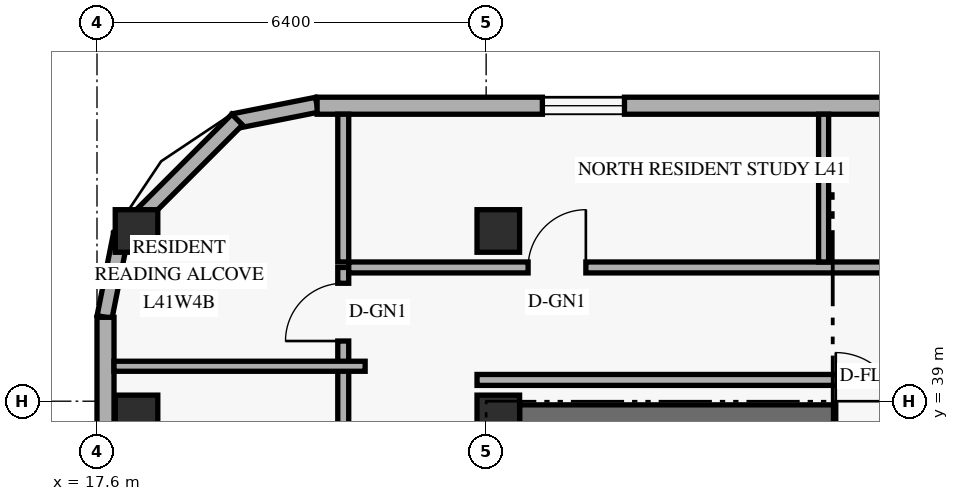
"""IFC4 building model, lengths in metres.
Left out: names, types, materials, properties, quantities, classifications, styles, units other than length and angle.
Written with IfcOpenShell. Run it as: python <this file> out.ifc"""

import sys

from ifc_helpers import new_model, si_unit, direction, frame, frame_2d, origin, origin_2d, place, context, subcontext, project, spatial, rectangle, extrude, element, fill, save


model = new_model("IFC4")
c1 = context("Model", 3, precision=1e-05, world=origin(), true_north=direction((0.0, 1.0)))
c2 = subcontext(c1, "Body", "Model", "MODEL_VIEW")
j1 = project(units=[si_unit("LENGTHUNIT", "METRE"), si_unit("PLANEANGLEUNIT", "RADIAN")], contexts=[c1])
p1 = place(None, origin())
s1 = spatial("IfcSite", under=j1, at=p1, CompositionType="ELEMENT")
p2 = place(p1, origin())
s2 = spatial("IfcBuilding", under=s1, at=p2, CompositionType="ELEMENT")
p3 = place(p2, frame((0.0, 0.0, 159.0)))
s3 = spatial("IfcBuildingStorey", under=s2, at=p3, CompositionType="ELEMENT", Elevation=159.0)
p4 = place(p3, frame((24.55, 38.75, 0.0), z_axis=(0.0, 0.0, 1.0), x_axis=(1.0, 0.0, 0.0)))
e1 = element("IfcWall", 1, at=p4, inside=s3, PredefinedType="SHEAR", context=c2, shape_type="SweptSolid", body=[
    extrude(rectangle(XDim=10.3, YDim=0.38, at=frame_2d((5.15, 0.0))), origin(), (0.0, 0.0, 1.0), 3.36),
])
p5 = place(p4, frame((5.2, 0.0, 0.0)))
e2 = element("IfcOpeningElement", 2, at=p5, cuts=e1, PredefinedType="OPENING", context=c2, shape_type="SweptSolid", body=[
    extrude(rectangle(XDim=1.05, YDim=2.15, at=frame_2d((0.525, 1.075))), frame((0.0, 0.2, 0.0), z_axis=(0.0, -1.0, 0.0), x_axis=(1.0, 0.0, 0.0)), (0.0, 0.0, 1.0), 0.4),
])
for number, where, z_axis, x_axis in (
    (3, (18.25, 38.75, 0.0), (0.0, 0.0, 1.0), (1.0, 0.0, 0.0)),
    (4, (18.25, 41.8, 0.0), (0.0, 0.0, 1.0), (1.0, 0.0, 0.0)),
    (5, (24.2, 38.75, 0.0), (0.0, 0.0, 1.0), (1.0, 0.0, 0.0)),
    (6, (24.2, 41.8, 0.0), (0.0, 0.0, 1.0), (1.0, 0.0, 0.0)),
):
    element("IfcColumn", number, at=place(p3, frame(where, z_axis=z_axis, x_axis=x_axis)), inside=s3, PredefinedType="COLUMN", context=c2, shape_type="SweptSolid", body=[
        extrude(rectangle(XDim=0.7, YDim=0.7, at=origin_2d()), origin(), (0.0, 0.0, 1.0), 3.6),
    ])
p6 = place(p3, frame((21.217, 43.876, 0.0), z_axis=(0.0, 0.0, 1.0), x_axis=(-0.980809899341, -0.19496651342, 0.0)))
e7 = element("IfcWall", 7, at=p6, inside=s3, PredefinedType="SOLIDWALL", context=c2, shape_type="SweptSolid", body=[
    extrude(rectangle(XDim=1.389, YDim=0.25, at=frame_2d((0.694, 0.0))), origin(), (0.0, 0.0, 1.0), 3.36),
])
p7 = place(p3, frame((19.905, 43.632, 0.0), z_axis=(0.0, 0.0, 1.0), x_axis=(-0.707106781187, -0.707106781187, 0.0)))
e8 = element("IfcWall", 8, at=p7, inside=s3, PredefinedType="SOLIDWALL", context=c2, shape_type="SweptSolid", body=[
    extrude(rectangle(XDim=2.739, YDim=0.25, at=frame_2d((1.37, 0.0))), origin(), (0.0, 0.0, 1.0), 3.36),
])
p8 = place(p3, frame((17.995, 41.746, 0.0), z_axis=(0.0, 0.0, 1.0), x_axis=(-0.195135625965, -0.9807762678, 0.0)))
e9 = element("IfcWall", 9, at=p8, inside=s3, PredefinedType="SOLIDWALL", context=c2, shape_type="SweptSolid", body=[
    extrude(rectangle(XDim=1.389, YDim=0.25, at=frame_2d((0.694, 0.0))), origin(), (0.0, 0.0, 1.0), 3.36),
])
p9 = place(p3, frame((54.98, 43.86, 0.0), z_axis=(0.0, 0.0, 1.0), x_axis=(-1.0, 0.0, 0.0)))
e10 = element("IfcWall", 10, at=p9, inside=s3, PredefinedType="SOLIDWALL", context=c2, shape_type="SweptSolid", body=[
    extrude(rectangle(XDim=33.76, YDim=0.28, at=frame_2d((16.88, 0.0))), origin(), (0.0, 0.0, 1.0), 3.36),
])
p10 = place(p9, frame((28.705, 0.0, 0.85)))
e11 = element("IfcOpeningElement", 11, at=p10, cuts=e10, PredefinedType="OPENING", context=c2, shape_type="SweptSolid", body=[
    extrude(rectangle(XDim=1.35, YDim=1.55, at=frame_2d((0.675, 0.775))), frame((0.0, 0.15, 0.0), z_axis=(0.0, -1.0, 0.0), x_axis=(1.0, 0.0, 0.0)), (0.0, 0.0, 1.0), 0.3),
])
p11 = place(p9, frame((21.82, 0.0, 0.85)))
e12 = element("IfcOpeningElement", 12, at=p11, cuts=e10, PredefinedType="OPENING", context=c2, shape_type="SweptSolid", body=[
    extrude(rectangle(XDim=1.35, YDim=1.55, at=frame_2d((0.675, 0.775))), frame((0.0, 0.15, 0.0), z_axis=(0.0, -1.0, 0.0), x_axis=(1.0, 0.0, 0.0)), (0.0, 0.0, 1.0), 0.3),
])
p12 = place(p9, frame((15.146, 0.0, 0.85)))
e13 = element("IfcOpeningElement", 13, at=p12, cuts=e10, PredefinedType="OPENING", context=c2, shape_type="SweptSolid", body=[
    extrude(rectangle(XDim=1.35, YDim=1.55, at=frame_2d((0.675, 0.775))), frame((0.0, 0.15, 0.0), z_axis=(0.0, -1.0, 0.0), x_axis=(1.0, 0.0, 0.0)), (0.0, 0.0, 1.0), 0.3),
])
p13 = place(p9, frame((7.956, 0.0, 0.85)))
e14 = element("IfcOpeningElement", 14, at=p13, cuts=e10, PredefinedType="OPENING", context=c2, shape_type="SweptSolid", body=[
    extrude(rectangle(XDim=1.35, YDim=1.55, at=frame_2d((0.675, 0.775))), frame((0.0, 0.15, 0.0), z_axis=(0.0, -1.0, 0.0), x_axis=(1.0, 0.0, 0.0)), (0.0, 0.0, 1.0), 0.3),
])
p14 = place(p9, frame((1.915, 0.0, 0.85)))
e15 = element("IfcOpeningElement", 15, at=p14, cuts=e10, PredefinedType="OPENING", context=c2, shape_type="SweptSolid", body=[
    extrude(rectangle(XDim=1.35, YDim=1.55, at=frame_2d((0.675, 0.775))), frame((0.0, 0.15, 0.0), z_axis=(0.0, -1.0, 0.0), x_axis=(1.0, 0.0, 0.0)), (0.0, 0.0, 1.0), 0.3),
])
p15 = place(p3, frame((17.74, 40.38, 0.0), z_axis=(0.0, 0.0, 1.0), x_axis=(0.0, -1.0, 0.0)))
e16 = element("IfcWall", 16, at=p15, inside=s3, PredefinedType="SOLIDWALL", context=c2, shape_type="SweptSolid", body=[
    extrude(rectangle(XDim=32.76, YDim=0.28, at=frame_2d((16.38, 0.0))), origin(), (0.0, 0.0, 1.0), 3.36),
])
p16 = place(p15, frame((27.91, 0.0, 0.85)))
e17 = element("IfcOpeningElement", 17, at=p16, cuts=e16, PredefinedType="OPENING", context=c2, shape_type="SweptSolid", body=[
    extrude(rectangle(XDim=1.65, YDim=1.6, at=frame_2d((0.825, 0.8))), frame((0.0, 0.15, 0.0), z_axis=(0.0, -1.0, 0.0), x_axis=(1.0, 0.0, 0.0)), (0.0, 0.0, 1.0), 0.3),
])
p17 = place(p15, frame((24.2, 0.0, 0.85)))
e18 = element("IfcOpeningElement", 18, at=p17, cuts=e16, PredefinedType="OPENING", context=c2, shape_type="SweptSolid", body=[
    extrude(rectangle(XDim=1.65, YDim=1.6, at=frame_2d((0.825, 0.8))), frame((0.0, 0.15, 0.0), z_axis=(0.0, -1.0, 0.0), x_axis=(1.0, 0.0, 0.0)), (0.0, 0.0, 1.0), 0.3),
])
p18 = place(p15, frame((18.38, 0.0, 0.85)))
e19 = element("IfcOpeningElement", 19, at=p18, cuts=e16, PredefinedType="OPENING", context=c2, shape_type="SweptSolid", body=[
    extrude(rectangle(XDim=1.65, YDim=1.6, at=frame_2d((0.825, 0.8))), frame((0.0, 0.15, 0.0), z_axis=(0.0, -1.0, 0.0), x_axis=(1.0, 0.0, 0.0)), (0.0, 0.0, 1.0), 0.3),
])
p19 = place(p15, frame((12.955, 0.0, 0.85)))
e20 = element("IfcOpeningElement", 20, at=p19, cuts=e16, PredefinedType="OPENING", context=c2, shape_type="SweptSolid", body=[
    extrude(rectangle(XDim=1.65, YDim=1.6, at=frame_2d((0.825, 0.8))), frame((0.0, 0.15, 0.0), z_axis=(0.0, -1.0, 0.0), x_axis=(1.0, 0.0, 0.0)), (0.0, 0.0, 1.0), 0.3),
])
p20 = place(p15, frame((7.035, 0.0, 0.85)))
e21 = element("IfcOpeningElement", 21, at=p20, cuts=e16, PredefinedType="OPENING", context=c2, shape_type="SweptSolid", body=[
    extrude(rectangle(XDim=1.65, YDim=1.6, at=frame_2d((0.825, 0.8))), frame((0.0, 0.15, 0.0), z_axis=(0.0, -1.0, 0.0), x_axis=(1.0, 0.0, 0.0)), (0.0, 0.0, 1.0), 0.3),
])
p21 = place(p15, frame((3.2, 0.0, 0.85)))
e22 = element("IfcOpeningElement", 22, at=p21, cuts=e16, PredefinedType="OPENING", context=c2, shape_type="SweptSolid", body=[
    extrude(rectangle(XDim=1.65, YDim=1.6, at=frame_2d((0.825, 0.8))), frame((0.0, 0.15, 0.0), z_axis=(0.0, -1.0, 0.0), x_axis=(1.0, 0.0, 0.0)), (0.0, 0.0, 1.0), 0.3),
])
p22 = place(p3, frame((21.65, 6.8, 0.0), z_axis=(0.0, 0.0, 1.0), x_axis=(0.0, 1.0, 0.0)))
e23 = element("IfcWall", 23, at=p22, inside=s3, PredefinedType="STANDARD", context=c2, shape_type="SweptSolid", body=[
    extrude(rectangle(XDim=34.4, YDim=0.18, at=frame_2d((17.2, 0.0))), origin(), (0.0, 0.0, 1.0), 2.73),
])
p23 = place(p22, frame((0.3, 0.0, 0.0)))
e24 = element("IfcOpeningElement", 24, at=p23, cuts=e23, PredefinedType="OPENING", context=c2, shape_type="SweptSolid", body=[
    extrude(rectangle(XDim=0.95, YDim=2.15, at=frame_2d((0.475, 1.075))), frame((0.0, 0.1, 0.0), z_axis=(0.0, -1.0, 0.0), x_axis=(1.0, 0.0, 0.0)), (0.0, 0.0, 1.0), 0.2),
])
p24 = place(p22, frame((4.167, 0.0, 0.0)))
e25 = element("IfcOpeningElement", 25, at=p24, cuts=e23, PredefinedType="OPENING", context=c2, shape_type="SweptSolid", body=[
    extrude(rectangle(XDim=0.95, YDim=2.15, at=frame_2d((0.475, 1.075))), frame((0.0, 0.1, 0.0), z_axis=(0.0, -1.0, 0.0), x_axis=(1.0, 0.0, 0.0)), (0.0, 0.0, 1.0), 0.2),
])
p25 = place(p22, frame((8.77, 0.0, 0.0)))
e26 = element("IfcOpeningElement", 26, at=p25, cuts=e23, PredefinedType="OPENING", context=c2, shape_type="SweptSolid", body=[
    extrude(rectangle(XDim=0.95, YDim=2.15, at=frame_2d((0.475, 1.075))), frame((0.0, 0.1, 0.0), z_axis=(0.0, -1.0, 0.0), x_axis=(1.0, 0.0, 0.0)), (0.0, 0.0, 1.0), 0.2),
])
p26 = place(p22, frame((13.88, 0.0, 0.0)))
e27 = element("IfcOpeningElement", 27, at=p26, cuts=e23, PredefinedType="OPENING", context=c2, shape_type="SweptSolid", body=[
    extrude(rectangle(XDim=0.95, YDim=2.15, at=frame_2d((0.475, 1.075))), frame((0.0, 0.1, 0.0), z_axis=(0.0, -1.0, 0.0), x_axis=(1.0, 0.0, 0.0)), (0.0, 0.0, 1.0), 0.2),
])
p27 = place(p22, frame((19.395, 0.0, 0.0)))
e28 = element("IfcOpeningElement", 28, at=p27, cuts=e23, PredefinedType="OPENING", context=c2, shape_type="SweptSolid", body=[
    extrude(rectangle(XDim=0.95, YDim=2.15, at=frame_2d((0.475, 1.075))), frame((0.0, 0.1, 0.0), z_axis=(0.0, -1.0, 0.0), x_axis=(1.0, 0.0, 0.0)), (0.0, 0.0, 1.0), 0.2),
])
p28 = place(p22, frame((24.505, 0.0, 0.0)))
e29 = element("IfcOpeningElement", 29, at=p28, cuts=e23, PredefinedType="OPENING", context=c2, shape_type="SweptSolid", body=[
    extrude(rectangle(XDim=0.95, YDim=2.15, at=frame_2d((0.475, 1.075))), frame((0.0, 0.1, 0.0), z_axis=(0.0, -1.0, 0.0), x_axis=(1.0, 0.0, 0.0)), (0.0, 0.0, 1.0), 0.2),
])
p29 = place(p22, frame((29.782, 0.0, 0.0)))
e30 = element("IfcOpeningElement", 30, at=p29, cuts=e23, PredefinedType="OPENING", context=c2, shape_type="SweptSolid", body=[
    extrude(rectangle(XDim=0.95, YDim=2.15, at=frame_2d((0.475, 1.075))), frame((0.0, 0.1, 0.0), z_axis=(0.0, -1.0, 0.0), x_axis=(1.0, 0.0, 0.0)), (0.0, 0.0, 1.0), 0.2),
])
p30 = place(p22, frame((33.19, 0.0, 0.0)))
e31 = element("IfcOpeningElement", 31, at=p30, cuts=e23, PredefinedType="OPENING", context=c2, shape_type="SweptSolid", body=[
    extrude(rectangle(XDim=0.95, YDim=2.15, at=frame_2d((0.475, 1.075))), frame((0.0, 0.1, 0.0), z_axis=(0.0, -1.0, 0.0), x_axis=(1.0, 0.0, 0.0)), (0.0, 0.0, 1.0), 0.2),
])
p31 = place(p3, frame((21.74, 41.2, 0.0), z_axis=(0.0, 0.0, 1.0), x_axis=(1.0, 0.0, 0.0)))
e32 = element("IfcWall", 32, at=p31, inside=s3, PredefinedType="STANDARD", context=c2, shape_type="SweptSolid", body=[
    extrude(rectangle(XDim=13.68, YDim=0.18, at=frame_2d((6.84, 0.0))), origin(), (0.0, 0.0, 1.0), 2.73),
])
p32 = place(p31, frame((2.95, 0.0, 0.0)))
e33 = element("IfcOpeningElement", 33, at=p32, cuts=e32, PredefinedType="OPENING", context=c2, shape_type="SweptSolid", body=[
    extrude(rectangle(XDim=0.95, YDim=2.15, at=frame_2d((0.475, 1.075))), frame((0.0, 0.1, 0.0), z_axis=(0.0, -1.0, 0.0), x_axis=(1.0, 0.0, 0.0)), (0.0, 0.0, 1.0), 0.2),
])
p33 = place(p31, frame((10.11, 0.0, 0.0)))
e34 = element("IfcOpeningElement", 34, at=p33, cuts=e32, PredefinedType="OPENING", context=c2, shape_type="SweptSolid", body=[
    extrude(rectangle(XDim=0.95, YDim=2.15, at=frame_2d((0.475, 1.075))), frame((0.0, 0.1, 0.0), z_axis=(0.0, -1.0, 0.0), x_axis=(1.0, 0.0, 0.0)), (0.0, 0.0, 1.0), 0.2),
])
p34 = place(p3, frame((23.85, 39.35, 0.0), z_axis=(0.0, 0.0, 1.0), x_axis=(1.0, 0.0, 0.0)))
e35 = element("IfcWall", 35, at=p34, inside=s3, PredefinedType="STANDARD", context=c2, shape_type="SweptSolid", body=[
    extrude(rectangle(XDim=11.57, YDim=0.18, at=frame_2d((5.785, 0.0))), origin(), (0.0, 0.0, 1.0), 2.73),
])
p35 = place(p3, frame((21.65, 41.29, 0.0), z_axis=(0.0, 0.0, 1.0), x_axis=(0.0, 1.0, 0.0)))
e36 = element("IfcWall", 36, at=p35, inside=s3, PredefinedType="PARTITIONING", context=c2, shape_type="SweptSolid", body=[
    extrude(rectangle(XDim=2.43, YDim=0.18, at=frame_2d((1.215, 0.0))), origin(), (0.0, 0.0, 1.0), 2.879),
])
p36 = place(p3, frame((17.88, 39.575, 0.0), z_axis=(0.0, 0.0, 1.0), x_axis=(1.0, 0.0, 0.0)))
e37 = element("IfcWall", 37, at=p36, inside=s3, PredefinedType="PARTITIONING", context=c2, shape_type="SweptSolid", body=[
    extrude(rectangle(XDim=4.13, YDim=0.165, at=frame_2d((2.065, 0.0))), origin(), (0.0, 0.0, 1.0), 2.879),
])
p37 = place(p3, frame((29.55, 41.29, 0.0), z_axis=(0.0, 0.0, 1.0), x_axis=(0.0, 1.0, 0.0)))
e38 = element("IfcWall", 38, at=p37, inside=s3, PredefinedType="PARTITIONING", context=c2, shape_type="SweptSolid", body=[
    extrude(rectangle(XDim=2.43, YDim=0.165, at=frame_2d((1.215, 0.0))), origin(), (0.0, 0.0, 1.0), 2.879),
])
p38 = place(p10, origin())
e39 = element("IfcWindow", 39, at=p38, inside=s3, PartitioningType="SINGLE_PANEL", PredefinedType="WINDOW", context=c2, shape_type="SweptSolid", body=[
    extrude(rectangle(XDim=1.35, YDim=1.55, at=frame_2d((0.675, 0.775))), frame((0.0, 0.03, 0.0), z_axis=(0.0, -1.0, 0.0), x_axis=(1.0, 0.0, 0.0)), (0.0, 0.0, 1.0), 0.06),
])
fill(e11, e39)
p39 = place(p5, frame((1.05, 0.0, 0.0), z_axis=(0.0, 0.0, 1.0), x_axis=(-1.0, 0.0, 0.0)))
e40 = element("IfcDoor", 40, at=p39, inside=s3, OperationType="SINGLE_SWING_RIGHT", PredefinedType="DOOR", context=c2, shape_type="SweptSolid", body=[
    extrude(rectangle(XDim=1.05, YDim=2.15, at=frame_2d((0.525, 1.075))), frame((0.0, 0.025, 0.0), z_axis=(0.0, -1.0, 0.0), x_axis=(1.0, 0.0, 0.0)), (0.0, 0.0, 1.0), 0.05),
])
fill(e2, e40)
p40 = place(p30, origin())
e41 = element("IfcDoor", 41, at=p40, inside=s3, OperationType="SINGLE_SWING_LEFT", PredefinedType="DOOR", context=c2, shape_type="SweptSolid", body=[
    extrude(rectangle(XDim=0.95, YDim=2.15, at=frame_2d((0.475, 1.075))), frame((0.0, 0.025, 0.0), z_axis=(0.0, -1.0, 0.0), x_axis=(1.0, 0.0, 0.0)), (0.0, 0.0, 1.0), 0.05),
])
fill(e31, e41)
p41 = place(p32, origin())
e42 = element("IfcDoor", 42, at=p41, inside=s3, OperationType="SINGLE_SWING_RIGHT", PredefinedType="DOOR", context=c2, shape_type="SweptSolid", body=[
    extrude(rectangle(XDim=0.95, YDim=2.15, at=frame_2d((0.475, 1.075))), frame((0.0, 0.025, 0.0), z_axis=(0.0, -1.0, 0.0), x_axis=(1.0, 0.0, 0.0)), (0.0, 0.0, 1.0), 0.05),
])
fill(e33, e42)
save(model, sys.argv[1])
